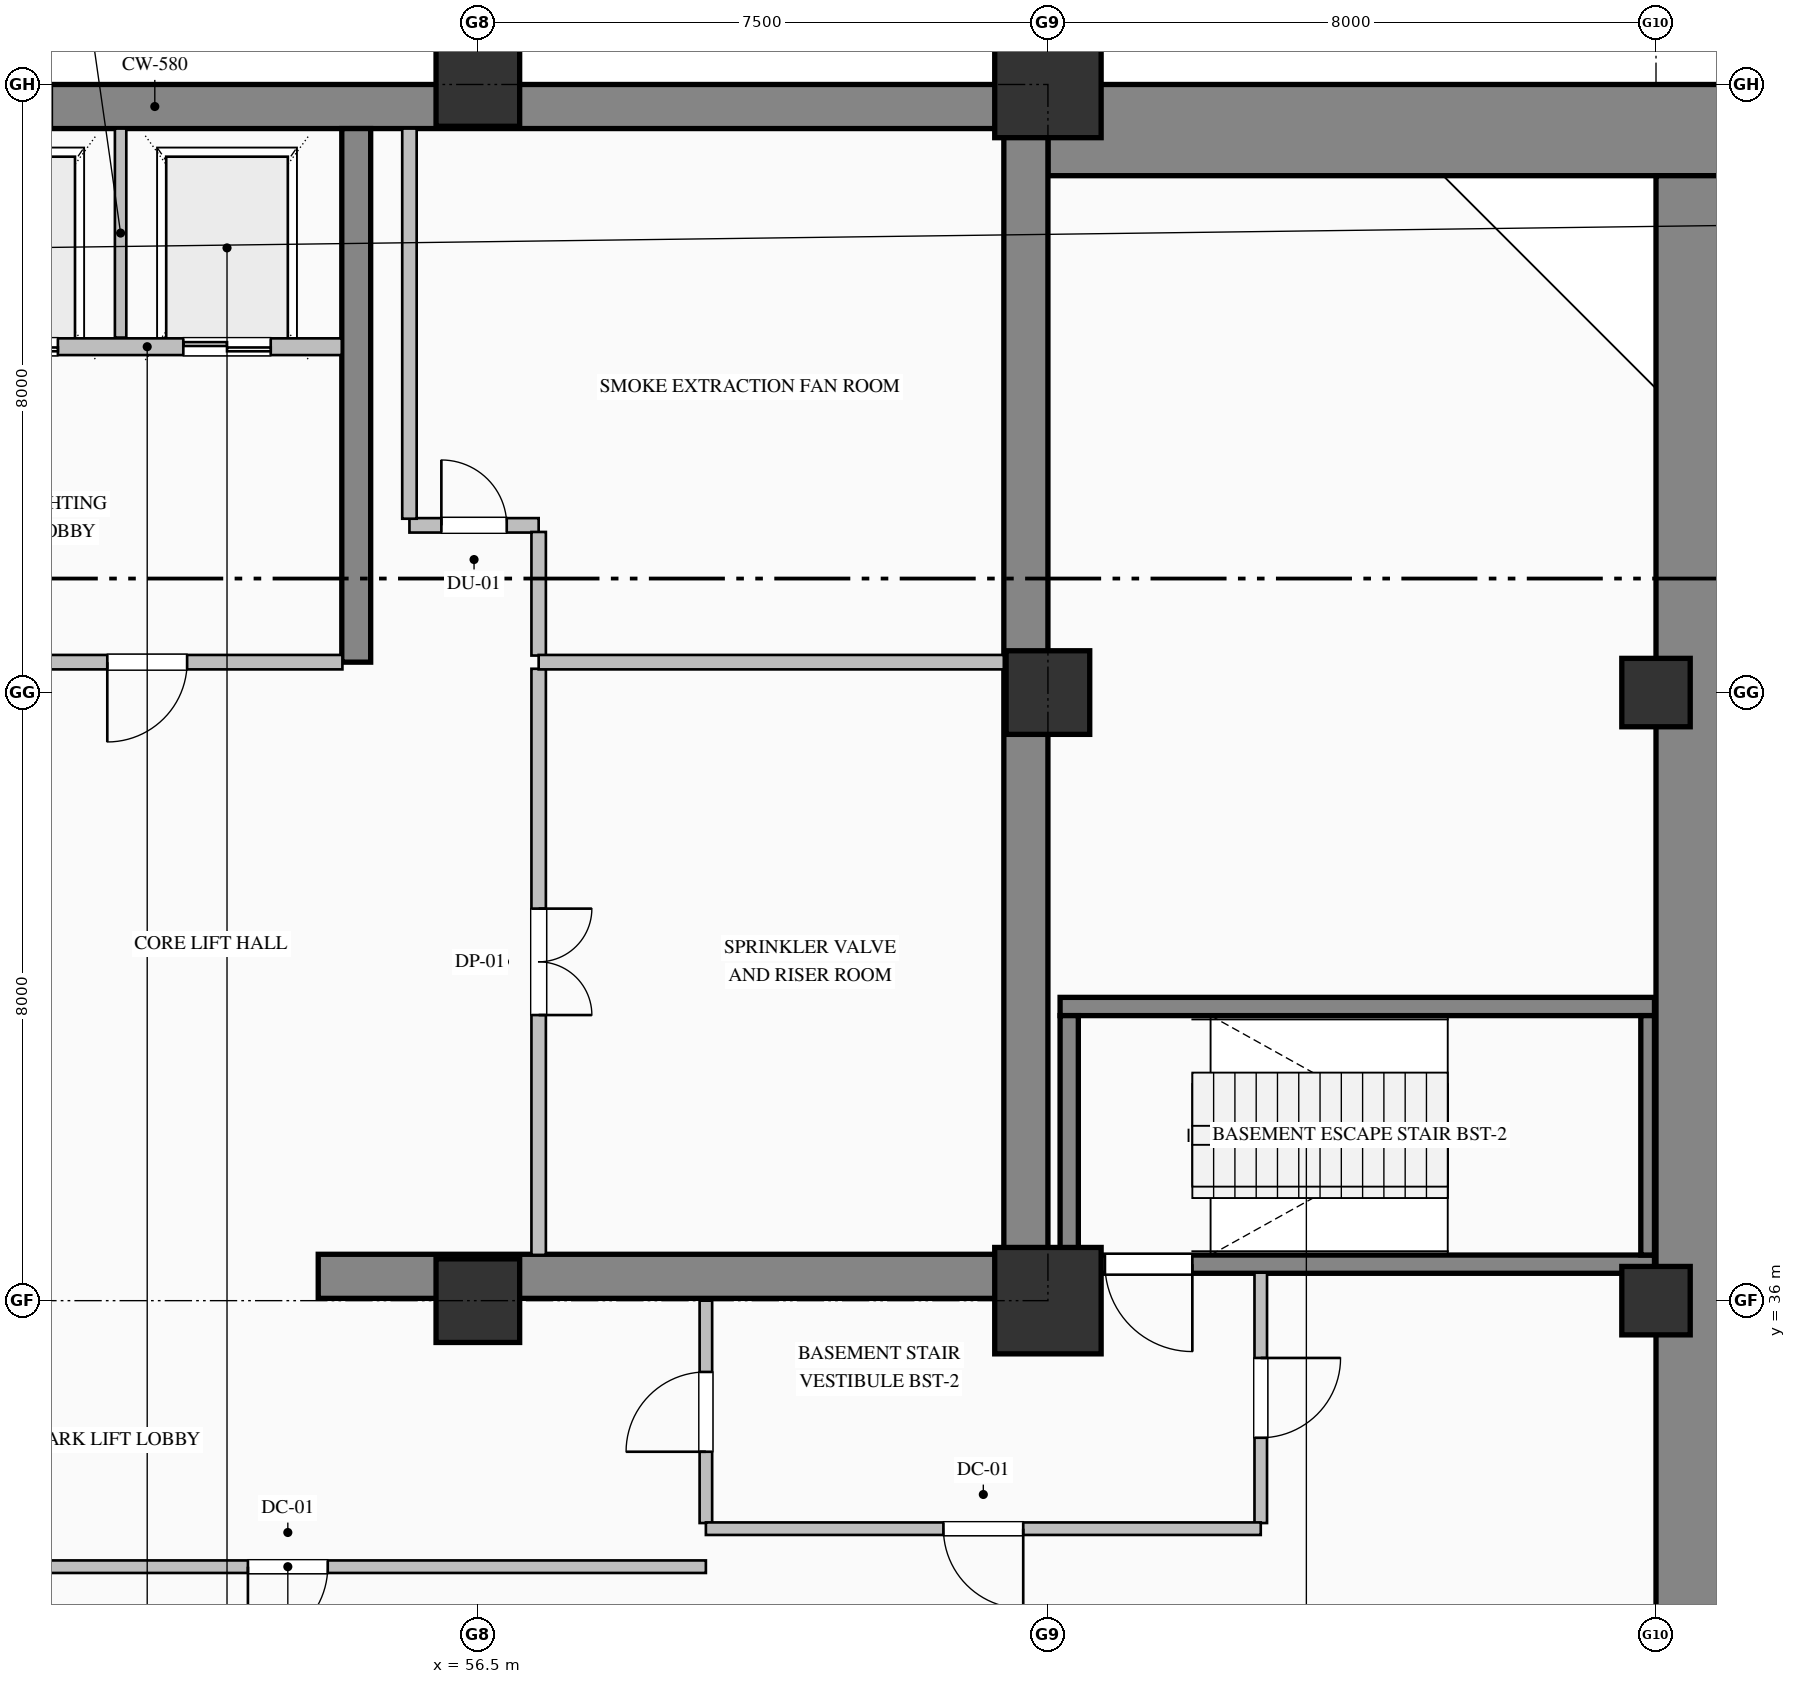
"""IFC4 building model, lengths in metres.
Left out: names, types, materials, properties, quantities, classifications, styles, units other than length and angle.
Written with IfcOpenShell. Run it as: python <this file> out.ifc"""

import sys

from ifc_helpers import new_model, si_unit, direction, frame, frame_2d, origin, origin_2d, place, context, subcontext, project, spatial, rectangle, hollow_rectangle, extrude, element, fill, save


model = new_model("IFC4")
c1 = context("Model", 3, precision=1e-05, world=origin(), true_north=direction((0.0, 1.0)))
c2 = subcontext(c1, "Body", "Model", "MODEL_VIEW")
j1 = project(units=[si_unit("LENGTHUNIT", "METRE"), si_unit("PLANEANGLEUNIT", "RADIAN")], contexts=[c1])
p1 = place(None, origin())
s1 = spatial("IfcSite", under=j1, at=p1, CompositionType="ELEMENT")
p2 = place(p1, origin())
s2 = spatial("IfcBuilding", under=s1, at=p2, CompositionType="ELEMENT")
p3 = place(p2, frame((0.0, 0.0, -4.6)))
s3 = spatial("IfcBuildingStorey", under=s2, at=p3, CompositionType="ELEMENT", Elevation=-4.6)
p4 = place(p3, frame((64.0, 51.4, 0.0), z_axis=(0.0, 0.0, 1.0), x_axis=(1.0, 0.0, 0.0)))
e1 = element("IfcWall", 1, at=p4, inside=s3, PredefinedType="USERDEFINED", context=c2, shape_type="SweptSolid", body=[
    extrude(rectangle(XDim=9.2, YDim=1.2, at=frame_2d((4.6, 0.0))), origin(), (0.0, 0.0, 1.0), 4.45),
])
p5 = place(p3, frame((72.6, 0.0, 0.0), z_axis=(0.0, 0.0, 1.0), x_axis=(0.0, 1.0, 0.0)))
e2 = element("IfcWall", 2, at=p5, inside=s3, PredefinedType="USERDEFINED", context=c2, shape_type="SweptSolid", body=[
    extrude(rectangle(XDim=50.8, YDim=1.2, at=frame_2d((25.4, 0.0))), origin(), (0.0, 0.0, 1.0), 4.45),
])
p6 = place(p3, frame((40.5, 51.71, 0.0), z_axis=(0.0, 0.0, 1.0), x_axis=(1.0, 0.0, 0.0)))
e3 = element("IfcWall", 3, at=p6, inside=s3, PredefinedType="SHEAR", context=c2, shape_type="SweptSolid", body=[
    extrude(rectangle(XDim=23.5, YDim=0.58, at=frame_2d((11.75, 0.0))), origin(), (0.0, 0.0, 1.0), 4.18),
])
p7 = place(p3, frame((63.71, 36.32, 0.0), z_axis=(0.0, 0.0, 1.0), x_axis=(0.0, 1.0, 0.0)))
e4 = element("IfcWall", 4, at=p7, inside=s3, PredefinedType="SHEAR", context=c2, shape_type="SweptSolid", body=[
    extrude(rectangle(XDim=15.1, YDim=0.58, at=frame_2d((7.55, 0.0))), origin(), (0.0, 0.0, 1.0), 4.18),
])
p8 = place(p3, frame((54.4, 36.32, 0.0), z_axis=(0.0, 0.0, 1.0), x_axis=(1.0, 0.0, 0.0)))
e5 = element("IfcWall", 5, at=p8, inside=s3, PredefinedType="SHEAR", context=c2, shape_type="SweptSolid", body=[
    extrude(rectangle(XDim=9.6, YDim=0.58, at=frame_2d((4.8, 0.0))), origin(), (0.0, 0.0, 1.0), 4.6),
])
p9 = place(p3, frame((54.9, 44.4, 0.0), z_axis=(0.0, 0.0, 1.0), x_axis=(0.0, 1.0, 0.0)))
e6 = element("IfcWall", 6, at=p9, inside=s3, PredefinedType="SHEAR", context=c2, shape_type="SweptSolid", body=[
    extrude(rectangle(XDim=7.02, YDim=0.38, at=frame_2d((3.51, 0.0))), origin(), (0.0, 0.0, 1.0), 4.18),
])
p10 = place(p3, frame((56.5, 36.0, 0.0), z_axis=(0.0, 0.0, 1.0), x_axis=(1.0, 0.0, 0.0)))
e7 = element("IfcColumn", 7, at=p10, inside=s3, PredefinedType="COLUMN", context=c2, shape_type="SweptSolid", body=[
    extrude(rectangle(XDim=1.1, YDim=1.1, at=origin_2d()), origin(), (0.0, 0.0, 1.0), 4.6),
])
p11 = place(p3, frame((56.5, 52.0, 0.0), z_axis=(0.0, 0.0, 1.0), x_axis=(1.0, 0.0, 0.0)))
e8 = element("IfcColumn", 8, at=p11, inside=s3, PredefinedType="COLUMN", context=c2, shape_type="SweptSolid", body=[
    extrude(hollow_rectangle(XDim=1.1, YDim=1.1, WallThickness=0.04, at=origin_2d()), origin(), (0.0, 0.0, 1.0), 4.6),
])
p12 = place(p3, frame((64.0, 36.0, 0.0), z_axis=(0.0, 0.0, 1.0), x_axis=(1.0, 0.0, 0.0)))
e9 = element("IfcColumn", 9, at=p12, inside=s3, PredefinedType="COLUMN", context=c2, shape_type="SweptSolid", body=[
    extrude(hollow_rectangle(XDim=1.4, YDim=1.4, WallThickness=0.05, at=origin_2d()), origin(), (0.0, 0.0, 1.0), 4.6),
])
p13 = place(p3, frame((64.0, 44.0, 0.0), z_axis=(0.0, 0.0, 1.0), x_axis=(1.0, 0.0, 0.0)))
e10 = element("IfcColumn", 10, at=p13, inside=s3, PredefinedType="COLUMN", context=c2, shape_type="SweptSolid", body=[
    extrude(rectangle(XDim=1.1, YDim=1.1, at=origin_2d()), origin(), (0.0, 0.0, 1.0), 4.6),
])
p14 = place(p3, frame((64.0, 52.0, 0.0), z_axis=(0.0, 0.0, 1.0), x_axis=(1.0, 0.0, 0.0)))
e11 = element("IfcColumn", 11, at=p14, inside=s3, PredefinedType="COLUMN", context=c2, shape_type="SweptSolid", body=[
    extrude(hollow_rectangle(XDim=1.4, YDim=1.4, WallThickness=0.05, at=origin_2d()), origin(), (0.0, 0.0, 1.0), 4.6),
])
for number, where, z_axis, x_axis in (
    (12, (72.0, 36.0, 0.0), (0.0, 0.0, 1.0), (1.0, 0.0, 0.0)),
    (13, (72.0, 44.0, 0.0), (0.0, 0.0, 1.0), (1.0, 0.0, 0.0)),
):
    element("IfcColumn", number, at=place(p3, frame(where, z_axis=z_axis, x_axis=x_axis)), inside=s3, PredefinedType="PILASTER", context=c2, shape_type="SweptSolid", body=[
        extrude(rectangle(XDim=0.9, YDim=0.9, at=origin_2d()), origin(), (0.0, 0.0, 1.0), 4.6),
    ])
p15 = place(p3, frame((64.16, 39.87, 0.0), z_axis=(0.0, 0.0, 1.0), x_axis=(1.0, 0.0, 0.0)))
e14 = element("IfcWall", 14, at=p15, inside=s3, PredefinedType="SOLIDWALL", context=c2, shape_type="SweptSolid", body=[
    extrude(rectangle(XDim=7.82, YDim=0.24, at=frame_2d((3.91, 0.0))), origin(), (0.0, 0.0, 1.0), 4.6),
])
p16 = place(p3, frame((71.98, 36.48, 0.0), z_axis=(0.0, 0.0, 1.0), x_axis=(-1.0, 0.0, 0.0)))
e15 = element("IfcWall", 15, at=p16, inside=s3, PredefinedType="SOLIDWALL", context=c2, shape_type="SweptSolid", body=[
    extrude(rectangle(XDim=7.82, YDim=0.24, at=frame_2d((3.91, 0.0))), origin(), (0.0, 0.0, 1.0), 4.6),
])
p17 = place(p16, frame((6.08, 0.0, 0.0)))
e16 = element("IfcOpeningElement", 16, at=p17, cuts=e15, PredefinedType="OPENING", context=c2, shape_type="SweptSolid", body=[
    extrude(rectangle(XDim=1.15, YDim=2.2, at=frame_2d((0.575, 1.1))), frame((0.0, 0.13, 0.0), z_axis=(0.0, -1.0, 0.0), x_axis=(1.0, 0.0, 0.0)), (0.0, 0.0, 1.0), 0.26),
])
p18 = place(p3, frame((64.28, 39.75, 0.0), z_axis=(0.0, 0.0, 1.0), x_axis=(0.0, -1.0, 0.0)))
e17 = element("IfcWall", 17, at=p18, inside=s3, PredefinedType="SOLIDWALL", context=c2, shape_type="SweptSolid", body=[
    extrude(rectangle(XDim=3.15, YDim=0.24, at=frame_2d((1.575, 0.0))), origin(), (0.0, 0.0, 1.0), 4.6),
])
p19 = place(p3, frame((71.89, 36.6, 0.0), z_axis=(0.0, 0.0, 1.0), x_axis=(0.0, 1.0, 0.0)))
e18 = element("IfcWall", 18, at=p19, inside=s3, PredefinedType="SOLIDWALL", context=c2, shape_type="SweptSolid", body=[
    extrude(rectangle(XDim=3.15, YDim=0.18, at=frame_2d((1.575, 0.0))), origin(), (0.0, 0.0, 1.0), 4.6),
])
p20 = place(p3, frame((54.71, 48.55, 0.0), z_axis=(0.0, 0.0, 1.0), x_axis=(-1.0, 0.0, 0.0)))
e19 = element("IfcWall", 19, at=p20, inside=s3, PredefinedType="PARTITIONING", context=c2, shape_type="SweptSolid", body=[
    extrude(rectangle(XDim=5.12, YDim=0.22, at=frame_2d((2.56, 0.0))), origin(), (0.0, 0.0, 1.0), 4.18),
])
p21 = place(p20, frame((3.735, 0.0, 0.0)))
e20 = element("IfcOpeningElement", 20, at=p21, cuts=e19, PredefinedType="OPENING", context=c2, shape_type="SweptSolid", body=[
    extrude(rectangle(XDim=1.15, YDim=2.2, at=frame_2d((0.575, 1.1))), frame((0.0, 0.12, 0.0), z_axis=(0.0, -1.0, 0.0), x_axis=(1.0, 0.0, 0.0)), (0.0, 0.0, 1.0), 0.24),
])
p22 = place(p20, frame((0.935, 0.0, 0.0)))
e21 = element("IfcOpeningElement", 21, at=p22, cuts=e19, PredefinedType="OPENING", context=c2, shape_type="SweptSolid", body=[
    extrude(rectangle(XDim=1.15, YDim=2.2, at=frame_2d((0.575, 1.1))), frame((0.0, 0.12, 0.0), z_axis=(0.0, -1.0, 0.0), x_axis=(1.0, 0.0, 0.0)), (0.0, 0.0, 1.0), 0.24),
])
p23 = place(p3, frame((51.8, 48.67, 0.0), z_axis=(0.0, 0.0, 1.0), x_axis=(0.0, 1.0, 0.0)))
e22 = element("IfcWall", 22, at=p23, inside=s3, PredefinedType="PARTITIONING", context=c2, shape_type="SweptSolid", body=[
    extrude(rectangle(XDim=2.75, YDim=0.15, at=frame_2d((1.375, 0.0))), origin(), (0.0, 0.0, 1.0), 4.18),
])
p24 = place(p3, frame((54.718, 44.4, 0.0), z_axis=(0.0, 0.0, 1.0), x_axis=(-1.0, 0.0, 0.0)))
e23 = element("IfcWall", 23, at=p24, inside=s3, PredefinedType="PARTITIONING", context=c2, shape_type="SweptSolid", body=[
    extrude(rectangle(XDim=5.136, YDim=0.19, at=frame_2d((2.568, 0.0))), origin(), (0.0, 0.0, 1.0), 4.18),
])
p25 = place(p24, frame((2.043, 0.0, 0.0)))
e24 = element("IfcOpeningElement", 24, at=p25, cuts=e23, PredefinedType="OPENING", context=c2, shape_type="SweptSolid", body=[
    extrude(rectangle(XDim=1.05, YDim=2.15, at=frame_2d((0.525, 1.075))), frame((0.0, 0.105, 0.0), z_axis=(0.0, -1.0, 0.0), x_axis=(1.0, 0.0, 0.0)), (0.0, 0.0, 1.0), 0.21),
])
p26 = place(p3, frame((57.3, 44.313, 0.0), z_axis=(0.0, 0.0, 1.0), x_axis=(0.0, -1.0, 0.0)))
e25 = element("IfcWall", 25, at=p26, inside=s3, PredefinedType="PARTITIONING", context=c2, shape_type="SweptSolid", body=[
    extrude(rectangle(XDim=7.711, YDim=0.19, at=frame_2d((3.855, 0.0))), origin(), (0.0, 0.0, 1.0), 4.18),
])
p27 = place(p26, frame((3.156, 0.0, 0.0)))
e26 = element("IfcOpeningElement", 26, at=p27, cuts=e25, PredefinedType="OPENING", context=c2, shape_type="SweptSolid", body=[
    extrude(rectangle(XDim=1.4, YDim=2.25, at=frame_2d((0.7, 1.125))), frame((0.0, 0.105, 0.0), z_axis=(0.0, -1.0, 0.0), x_axis=(1.0, 0.0, 0.0)), (0.0, 0.0, 1.0), 0.21),
])
p28 = place(p3, frame((55.6, 46.2, 0.0), z_axis=(0.0, 0.0, 1.0), x_axis=(1.0, 0.0, 0.0)))
e27 = element("IfcWall", 27, at=p28, inside=s3, PredefinedType="PARTITIONING", context=c2, shape_type="SweptSolid", body=[
    extrude(rectangle(XDim=1.7, YDim=0.19, at=frame_2d((0.85, 0.0))), origin(), (0.0, 0.0, 1.0), 4.18),
])
p29 = place(p28, frame((0.42, 0.0, 0.0)))
e28 = element("IfcOpeningElement", 28, at=p29, cuts=e27, PredefinedType="OPENING", context=c2, shape_type="SweptSolid", body=[
    extrude(rectangle(XDim=0.86, YDim=2.1, at=frame_2d((0.43, 1.05))), frame((0.0, 0.105, 0.0), z_axis=(0.0, -1.0, 0.0), x_axis=(1.0, 0.0, 0.0)), (0.0, 0.0, 1.0), 0.21),
])
p30 = place(p3, frame((57.3, 46.113, 0.0), z_axis=(0.0, 0.0, 1.0), x_axis=(0.0, -1.0, 0.0)))
e29 = element("IfcWall", 29, at=p30, inside=s3, PredefinedType="PARTITIONING", context=c2, shape_type="SweptSolid", body=[
    extrude(rectangle(XDim=1.626, YDim=0.19, at=frame_2d((0.813, 0.0))), origin(), (0.0, 0.0, 1.0), 4.18),
])
p31 = place(p3, frame((57.3, 44.4, 0.0), z_axis=(0.0, 0.0, 1.0), x_axis=(1.0, 0.0, 0.0)))
e30 = element("IfcWall", 30, at=p31, inside=s3, PredefinedType="PARTITIONING", context=c2, shape_type="SweptSolid", body=[
    extrude(rectangle(XDim=6.12, YDim=0.19, at=frame_2d((3.06, 0.0))), origin(), (0.0, 0.0, 1.0), 4.18),
])
p32 = place(p3, frame((55.6, 46.287, 0.0), z_axis=(0.0, 0.0, 1.0), x_axis=(0.0, 1.0, 0.0)))
e31 = element("IfcWall", 31, at=p32, inside=s3, PredefinedType="PARTITIONING", context=c2, shape_type="SweptSolid", body=[
    extrude(rectangle(XDim=5.133, YDim=0.19, at=frame_2d((2.566, 0.0))), origin(), (0.0, 0.0, 1.0), 4.18),
])
p33 = place(p3, frame((59.5, 33.074, 0.0), z_axis=(0.0, 0.0, 1.0), x_axis=(0.0, 1.0, 0.0)))
e32 = element("IfcWall", 32, at=p33, inside=s3, PredefinedType="PARTITIONING", context=c2, shape_type="SweptSolid", body=[
    extrude(rectangle(XDim=2.926, YDim=0.165, at=frame_2d((1.463, 0.0))), origin(), (0.0, 0.0, 1.0), 4.18),
])
p34 = place(p33, frame((0.938, 0.0, 0.0)))
e33 = element("IfcOpeningElement", 33, at=p34, cuts=e32, PredefinedType="OPENING", context=c2, shape_type="SweptSolid", body=[
    extrude(rectangle(XDim=1.05, YDim=2.15, at=frame_2d((0.525, 1.075))), frame((0.0, 0.093, 0.0), z_axis=(0.0, -1.0, 0.0), x_axis=(1.0, 0.0, 0.0)), (0.0, 0.0, 1.0), 0.185),
])
p35 = place(p3, frame((66.8, 36.368, 0.0), z_axis=(0.0, 0.0, 1.0), x_axis=(0.0, -1.0, 0.0)))
e34 = element("IfcWall", 34, at=p35, inside=s3, PredefinedType="PARTITIONING", context=c2, shape_type="SweptSolid", body=[
    extrude(rectangle(XDim=3.293, YDim=0.165, at=frame_2d((1.647, 0.0))), origin(), (0.0, 0.0, 1.0), 4.18),
])
p36 = place(p35, frame((1.122, 0.0, 0.0)))
e35 = element("IfcOpeningElement", 35, at=p36, cuts=e34, PredefinedType="OPENING", context=c2, shape_type="SweptSolid", body=[
    extrude(rectangle(XDim=1.05, YDim=2.15, at=frame_2d((0.525, 1.075))), frame((0.0, 0.093, 0.0), z_axis=(0.0, -1.0, 0.0), x_axis=(1.0, 0.0, 0.0)), (0.0, 0.0, 1.0), 0.185),
])
p37 = place(p3, frame((66.8, 33.0, 0.0), z_axis=(0.0, 0.0, 1.0), x_axis=(-1.0, 0.0, 0.0)))
e36 = element("IfcWall", 36, at=p37, inside=s3, PredefinedType="PARTITIONING", context=c2, shape_type="SweptSolid", body=[
    extrude(rectangle(XDim=7.3, YDim=0.165, at=frame_2d((3.65, 0.0))), origin(), (0.0, 0.0, 1.0), 4.18),
])
p38 = place(p37, frame((3.125, 0.0, 0.0)))
e37 = element("IfcOpeningElement", 37, at=p38, cuts=e36, PredefinedType="OPENING", context=c2, shape_type="SweptSolid", body=[
    extrude(rectangle(XDim=1.05, YDim=2.15, at=frame_2d((0.525, 1.075))), frame((0.0, 0.093, 0.0), z_axis=(0.0, -1.0, 0.0), x_axis=(1.0, 0.0, 0.0)), (0.0, 0.0, 1.0), 0.185),
])
p39 = place(p3, frame((59.5, 32.5, 0.0), z_axis=(0.0, 0.0, 1.0), x_axis=(-1.0, 0.0, 0.0)))
e38 = element("IfcWall", 38, at=p39, inside=s3, PredefinedType="PARTITIONING", context=c2, shape_type="SweptSolid", body=[
    extrude(rectangle(XDim=11.0, YDim=0.165, at=frame_2d((5.5, 0.0))), origin(), (0.0, 0.0, 1.0), 4.18),
])
p40 = place(p39, frame((4.975, 0.0, 0.0)))
e39 = element("IfcOpeningElement", 39, at=p40, cuts=e38, PredefinedType="OPENING", context=c2, shape_type="SweptSolid", body=[
    extrude(rectangle(XDim=1.05, YDim=2.15, at=frame_2d((0.525, 1.075))), frame((0.0, 0.093, 0.0), z_axis=(0.0, -1.0, 0.0), x_axis=(1.0, 0.0, 0.0)), (0.0, 0.0, 1.0), 0.185),
])
p41 = place(p17, origin())
e40 = element("IfcDoor", 40, at=p41, inside=s3, OperationType="SINGLE_SWING_LEFT", PredefinedType="DOOR", context=c2, shape_type="SweptSolid", body=[
    extrude(rectangle(XDim=1.15, YDim=2.2, at=frame_2d((0.575, 1.1))), frame((0.0, 0.025, 0.0), z_axis=(0.0, -1.0, 0.0), x_axis=(1.0, 0.0, 0.0)), (0.0, 0.0, 1.0), 0.05),
])
fill(e16, e40)
p42 = place(p21, origin())
e41 = element("IfcDoor", 41, at=p42, inside=s3, OperationType="DOUBLE_DOOR_SLIDING", PredefinedType="DOOR", context=c2, shape_type="SweptSolid", body=[
    extrude(rectangle(XDim=1.15, YDim=2.2, at=frame_2d((0.575, 1.1))), frame((0.0, 0.025, 0.0), z_axis=(0.0, -1.0, 0.0), x_axis=(1.0, 0.0, 0.0)), (0.0, 0.0, 1.0), 0.05),
])
fill(e20, e41)
p43 = place(p22, origin())
e42 = element("IfcDoor", 42, at=p43, inside=s3, OperationType="DOUBLE_DOOR_SLIDING", PredefinedType="DOOR", context=c2, shape_type="SweptSolid", body=[
    extrude(rectangle(XDim=1.15, YDim=2.2, at=frame_2d((0.575, 1.1))), frame((0.0, 0.025, 0.0), z_axis=(0.0, -1.0, 0.0), x_axis=(1.0, 0.0, 0.0)), (0.0, 0.0, 1.0), 0.05),
])
fill(e21, e42)
p44 = place(p40, origin())
e43 = element("IfcDoor", 43, at=p44, inside=s3, OperationType="SINGLE_SWING_RIGHT", PredefinedType="DOOR", context=c2, shape_type="SweptSolid", body=[
    extrude(rectangle(XDim=1.05, YDim=2.15, at=frame_2d((0.525, 1.075))), frame((0.0, 0.025, 0.0), z_axis=(0.0, -1.0, 0.0), x_axis=(1.0, 0.0, 0.0)), (0.0, 0.0, 1.0), 0.05),
])
fill(e39, e43)
p45 = place(p38, origin())
e44 = element("IfcDoor", 44, at=p45, inside=s3, OperationType="SINGLE_SWING_LEFT", PredefinedType="DOOR", context=c2, shape_type="SweptSolid", body=[
    extrude(rectangle(XDim=1.05, YDim=2.15, at=frame_2d((0.525, 1.075))), frame((0.0, 0.025, 0.0), z_axis=(0.0, -1.0, 0.0), x_axis=(1.0, 0.0, 0.0)), (0.0, 0.0, 1.0), 0.05),
])
fill(e37, e44)
p46 = place(p25, origin())
e45 = element("IfcDoor", 45, at=p46, inside=s3, OperationType="SINGLE_SWING_RIGHT", PredefinedType="DOOR", context=c2, shape_type="SweptSolid", body=[
    extrude(rectangle(XDim=1.05, YDim=2.15, at=frame_2d((0.525, 1.075))), frame((0.0, 0.025, 0.0), z_axis=(0.0, -1.0, 0.0), x_axis=(1.0, 0.0, 0.0)), (0.0, 0.0, 1.0), 0.05),
])
fill(e24, e45)
p47 = place(p36, origin())
e46 = element("IfcDoor", 46, at=p47, inside=s3, OperationType="SINGLE_SWING_LEFT", PredefinedType="DOOR", context=c2, shape_type="SweptSolid", body=[
    extrude(rectangle(XDim=1.05, YDim=2.15, at=frame_2d((0.525, 1.075))), frame((0.0, 0.025, 0.0), z_axis=(0.0, -1.0, 0.0), x_axis=(1.0, 0.0, 0.0)), (0.0, 0.0, 1.0), 0.05),
])
fill(e35, e46)
p48 = place(p34, origin())
e47 = element("IfcDoor", 47, at=p48, inside=s3, OperationType="SINGLE_SWING_LEFT", PredefinedType="DOOR", context=c2, shape_type="SweptSolid", body=[
    extrude(rectangle(XDim=1.05, YDim=2.15, at=frame_2d((0.525, 1.075))), frame((0.0, 0.025, 0.0), z_axis=(0.0, -1.0, 0.0), x_axis=(1.0, 0.0, 0.0)), (0.0, 0.0, 1.0), 0.05),
])
fill(e33, e47)
p49 = place(p27, origin())
e48 = element("IfcDoor", 48, at=p49, inside=s3, OperationType="DOUBLE_DOOR_SINGLE_SWING", PredefinedType="DOOR", context=c2, shape_type="SweptSolid", body=[
    extrude(rectangle(XDim=1.4, YDim=2.25, at=frame_2d((0.7, 1.125))), frame((0.0, 0.025, 0.0), z_axis=(0.0, -1.0, 0.0), x_axis=(1.0, 0.0, 0.0)), (0.0, 0.0, 1.0), 0.05),
])
fill(e26, e48)
p50 = place(p29, origin())
e49 = element("IfcDoor", 49, at=p50, inside=s3, OperationType="SINGLE_SWING_LEFT", PredefinedType="DOOR", context=c2, shape_type="SweptSolid", body=[
    extrude(rectangle(XDim=0.86, YDim=2.1, at=frame_2d((0.43, 1.05))), frame((0.0, 0.025, 0.0), z_axis=(0.0, -1.0, 0.0), x_axis=(1.0, 0.0, 0.0)), (0.0, 0.0, 1.0), 0.05),
])
fill(e28, e49)
save(model, sys.argv[1])
